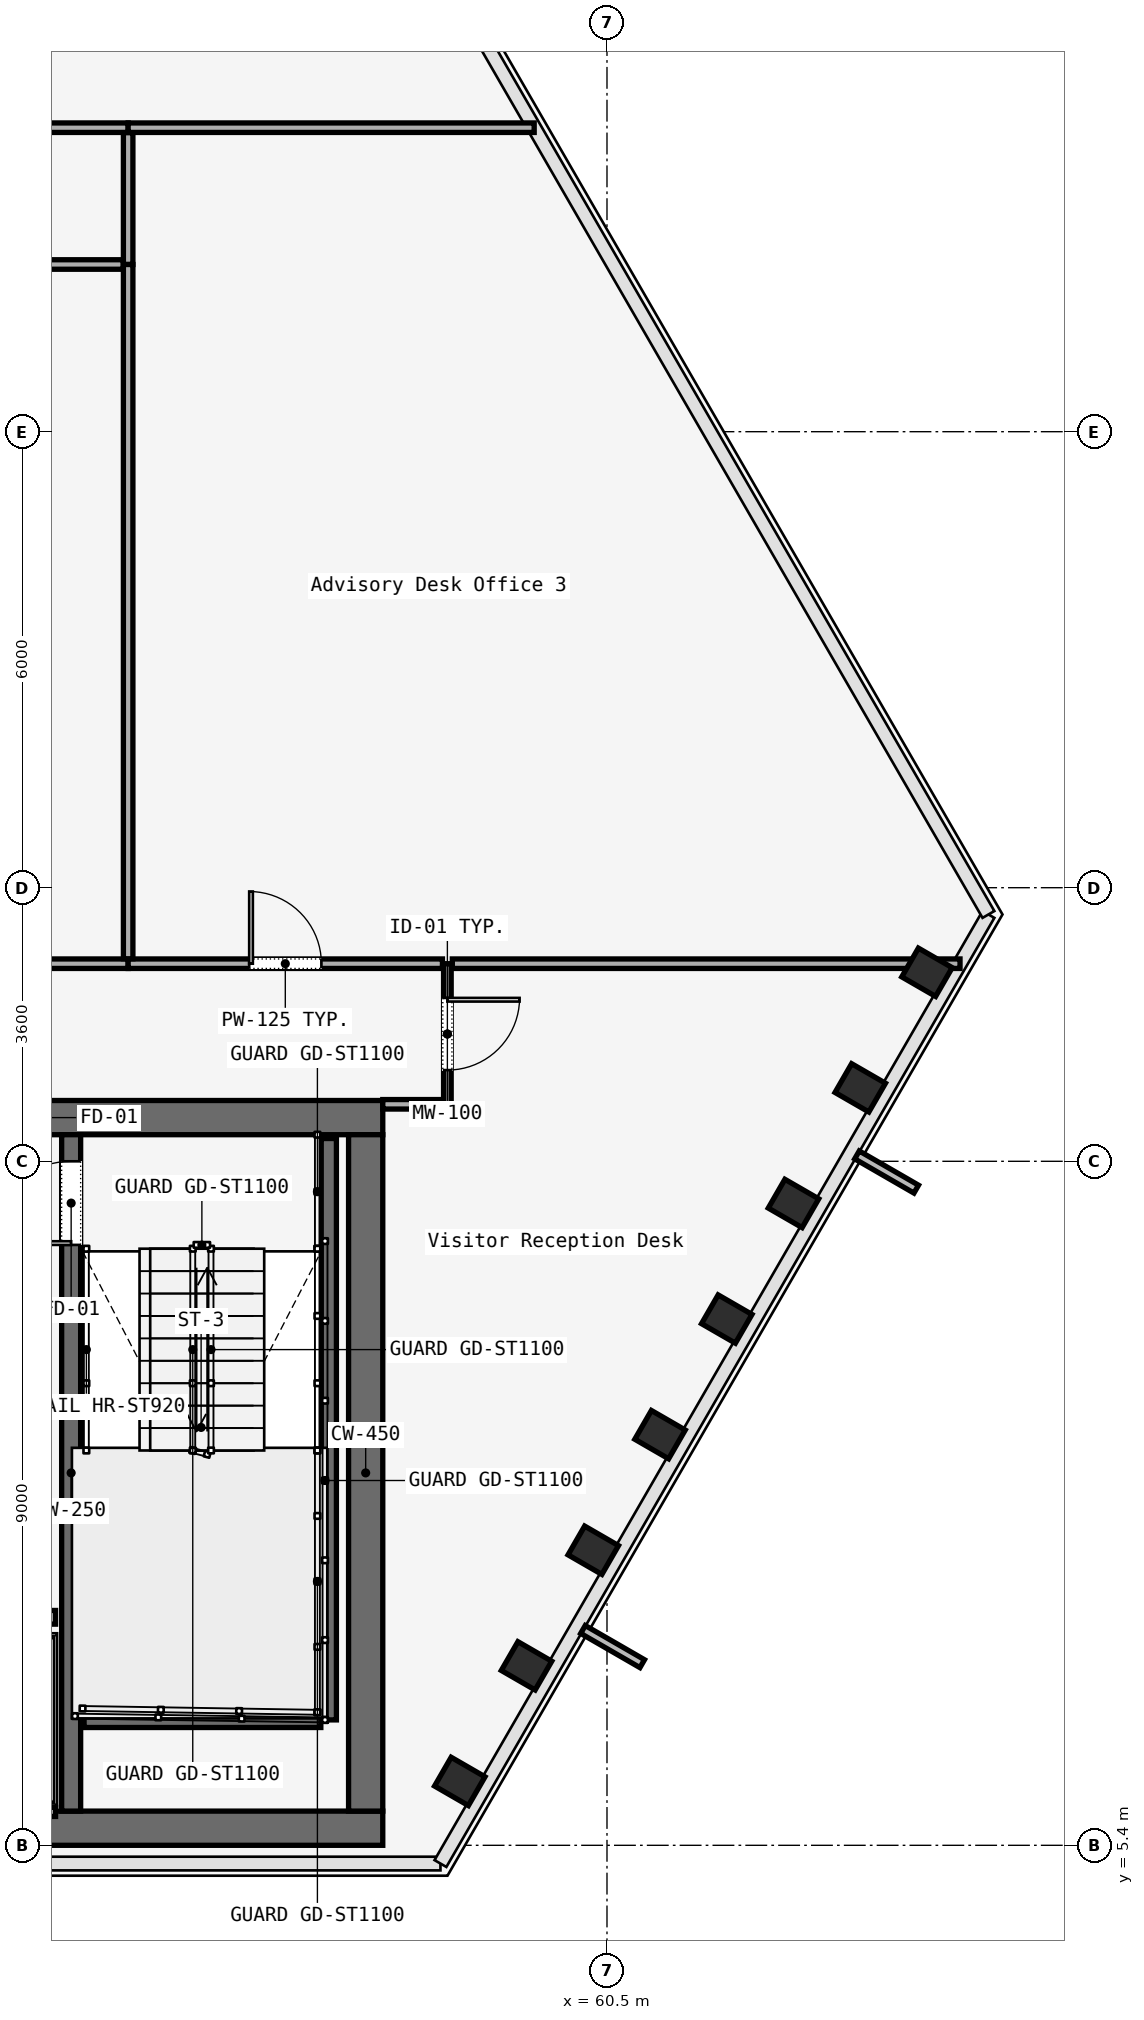
"""IFC4 building model, lengths in metres.
Left out: names, types, materials, properties, quantities, classifications, styles, units other than length and angle.
Written with IfcOpenShell. Run it as: python <this file> out.ifc"""

import sys

from ifc_helpers import new_model, si_unit, direction, frame, frame_2d, origin, origin_2d, place, context, subcontext, project, spatial, rectangle, i_section, extrude, element, fill, save


model = new_model("IFC4")
c1 = context("Model", 3, precision=1e-05, world=origin(), true_north=direction((0.0, 1.0)))
c2 = subcontext(c1, "Body", "Model", "MODEL_VIEW")
j1 = project(units=[si_unit("LENGTHUNIT", "METRE"), si_unit("PLANEANGLEUNIT", "RADIAN")], contexts=[c1])
p1 = place(None, origin())
s1 = spatial("IfcSite", under=j1, at=p1, CompositionType="ELEMENT")
p2 = place(p1, origin())
s2 = spatial("IfcBuilding", under=s1, at=p2, CompositionType="ELEMENT")
p3 = place(p2, frame((0.0, 0.0, 89.2)))
s3 = spatial("IfcBuildingStorey", under=s2, at=p3, CompositionType="ELEMENT", Elevation=89.2)
p4 = place(p3, frame((26.45, 14.975, 0.0), z_axis=(0.0, 0.0, 1.0), x_axis=(1.0, 0.0, 0.0)))
e1 = element("IfcWall", 1, at=p4, inside=s3, PredefinedType="SOLIDWALL", context=c2, shape_type="SweptSolid", body=[
    extrude(rectangle(XDim=31.1, YDim=0.45, at=frame_2d((15.55, 0.0))), origin(), (0.0, 0.0, 1.0), 3.58),
])
p5 = place(p4, frame((1.65, 0.0, 0.0)))
e2 = element("IfcOpeningElement", 2, at=p5, cuts=e1, PredefinedType="OPENING", context=c2, shape_type="SweptSolid", body=[
    extrude(rectangle(XDim=1.1, YDim=2.2, at=frame_2d((0.55, 1.1))), frame((0.0, 0.225, 0.0), z_axis=(0.0, -1.0, 0.0), x_axis=(1.0, 0.0, 0.0)), (0.0, 0.0, 1.0), 0.45),
])
p6 = place(p4, frame((13.65, 0.0, 0.0)))
e3 = element("IfcOpeningElement", 3, at=p6, cuts=e1, PredefinedType="OPENING", context=c2, shape_type="SweptSolid", body=[
    extrude(rectangle(XDim=1.1, YDim=2.2, at=frame_2d((0.55, 1.1))), frame((0.0, 0.225, 0.0), z_axis=(0.0, -1.0, 0.0), x_axis=(1.0, 0.0, 0.0)), (0.0, 0.0, 1.0), 0.45),
])
p7 = place(p4, frame((25.55, 0.0, 0.0)))
e4 = element("IfcOpeningElement", 4, at=p7, cuts=e1, PredefinedType="OPENING", context=c2, shape_type="SweptSolid", body=[
    extrude(rectangle(XDim=1.1, YDim=2.2, at=frame_2d((0.55, 1.1))), frame((0.0, 0.225, 0.0), z_axis=(0.0, -1.0, 0.0), x_axis=(1.0, 0.0, 0.0)), (0.0, 0.0, 1.0), 0.45),
])
p8 = place(p4, frame((10.7, 0.0, 0.0)))
e5 = element("IfcOpeningElement", 5, at=p8, cuts=e1, PredefinedType="OPENING", context=c2, shape_type="SweptSolid", body=[
    extrude(rectangle(XDim=1.4, YDim=2.2, at=frame_2d((0.7, 1.1))), frame((0.0, 0.225, 0.0), z_axis=(0.0, -1.0, 0.0), x_axis=(1.0, 0.0, 0.0)), (0.0, 0.0, 1.0), 0.45),
])
p9 = place(p4, frame((19.35, 0.0, 0.0)))
e6 = element("IfcOpeningElement", 6, at=p9, cuts=e1, PredefinedType="OPENING", context=c2, shape_type="SweptSolid", body=[
    extrude(rectangle(XDim=1.1, YDim=2.2, at=frame_2d((0.55, 1.1))), frame((0.0, 0.225, 0.0), z_axis=(0.0, -1.0, 0.0), x_axis=(1.0, 0.0, 0.0)), (0.0, 0.0, 1.0), 0.45),
])
p10 = place(p4, frame((21.4, 0.0, 0.0)))
e7 = element("IfcOpeningElement", 7, at=p10, cuts=e1, PredefinedType="OPENING", context=c2, shape_type="SweptSolid", body=[
    extrude(rectangle(XDim=0.9, YDim=2.1, at=frame_2d((0.45, 1.05))), frame((0.0, 0.225, 0.0), z_axis=(0.0, -1.0, 0.0), x_axis=(1.0, 0.0, 0.0)), (0.0, 0.0, 1.0), 0.45),
])
p11 = place(p4, frame((23.35, 0.0, 0.0)))
e8 = element("IfcOpeningElement", 8, at=p11, cuts=e1, PredefinedType="OPENING", context=c2, shape_type="SweptSolid", body=[
    extrude(rectangle(XDim=1.3, YDim=2.3, at=frame_2d((0.65, 1.15))), frame((0.0, 0.225, 0.0), z_axis=(0.0, -1.0, 0.0), x_axis=(1.0, 0.0, 0.0)), (0.0, 0.0, 1.0), 0.45),
])
p12 = place(p3, frame((26.45, 5.625, 0.0), z_axis=(0.0, 0.0, 1.0), x_axis=(1.0, 0.0, 0.0)))
e9 = element("IfcWall", 9, at=p12, inside=s3, PredefinedType="SOLIDWALL", context=c2, shape_type="SweptSolid", body=[
    extrude(rectangle(XDim=31.1, YDim=0.45, at=frame_2d((15.55, 0.0))), origin(), (0.0, 0.0, 1.0), 3.58),
])
p13 = place(p3, frame((57.325, 5.85, 0.0), z_axis=(0.0, 0.0, 1.0), x_axis=(0.0, 1.0, 0.0)))
e10 = element("IfcWall", 10, at=p13, inside=s3, PredefinedType="SOLIDWALL", context=c2, shape_type="SweptSolid", body=[
    extrude(rectangle(XDim=8.9, YDim=0.45, at=frame_2d((4.45, 0.0))), origin(), (0.0, 0.0, 1.0), 3.58),
])
p14 = place(p3, frame((53.45, 5.85, 0.0), z_axis=(0.0, 0.0, 1.0), x_axis=(0.0, 1.0, 0.0)))
e11 = element("IfcWall", 11, at=p14, inside=s3, PredefinedType="SOLIDWALL", context=c2, shape_type="SweptSolid", body=[
    extrude(rectangle(XDim=8.9, YDim=0.25, at=frame_2d((4.45, 0.0))), origin(), (0.0, 0.0, 1.0), 3.58),
])
p15 = place(p14, frame((7.45, 0.0, 0.0)))
e12 = element("IfcOpeningElement", 12, at=p15, cuts=e11, PredefinedType="OPENING", context=c2, shape_type="SweptSolid", body=[
    extrude(rectangle(XDim=1.1, YDim=2.2, at=frame_2d((0.55, 1.1))), frame((0.0, 0.125, 0.0), z_axis=(0.0, -1.0, 0.0), x_axis=(1.0, 0.0, 0.0)), (0.0, 0.0, 1.0), 0.25),
])
p16 = place(p3, frame((58.563, 6.24, 0.0), z_axis=(0.079599151352, -0.008496920511, 0.996790739045), x_axis=(-0.805297814331, 0.588803246695, 0.069326523896)))
e13 = element("IfcColumn", 13, at=p16, inside=s3, PredefinedType="COLUMN", context=c2, shape_type="SweptSolid", body=[
    extrude(i_section(OverallWidth=0.437, OverallDepth=0.514, WebThickness=0.061, FlangeThickness=0.077, FilletRadius=0.015, at=origin_2d()), origin(), (0.0, 0.0, 1.0), 3.592),
])
p17 = place(p3, frame((59.441, 7.761, 0.0), z_axis=(0.069841728492, -0.02543408613, 0.997233794165), x_axis=(-0.640403196751, 0.765336642111, 0.064370566504)))
e14 = element("IfcColumn", 14, at=p17, inside=s3, PredefinedType="COLUMN", context=c2, shape_type="SweptSolid", body=[
    extrude(i_section(OverallWidth=0.437, OverallDepth=0.514, WebThickness=0.061, FlangeThickness=0.077, FilletRadius=0.015, at=origin_2d()), origin(), (0.0, 0.0, 1.0), 3.59),
])
p18 = place(p3, frame((60.32, 9.282, 0.0), z_axis=(0.059984707223, -0.042438160212, 0.997296764989), x_axis=(-0.41629274108, 0.907001092511, 0.063634675352)))
e15 = element("IfcColumn", 15, at=p18, inside=s3, PredefinedType="COLUMN", context=c2, shape_type="SweptSolid", body=[
    extrude(i_section(OverallWidth=0.437, OverallDepth=0.514, WebThickness=0.061, FlangeThickness=0.077, FilletRadius=0.015, at=origin_2d()), origin(), (0.0, 0.0, 1.0), 3.59),
])
p19 = place(p3, frame((61.198, 10.803, 0.0), z_axis=(0.050175104004, -0.059353476687, 0.996975237277), x_axis=(-0.175563131942, 0.982164601536, 0.067307371012)))
e16 = element("IfcColumn", 16, at=p19, inside=s3, PredefinedType="COLUMN", context=c2, shape_type="SweptSolid", body=[
    extrude(i_section(OverallWidth=0.437, OverallDepth=0.514, WebThickness=0.061, FlangeThickness=0.077, FilletRadius=0.015, at=origin_2d()), origin(), (0.0, 0.0, 1.0), 3.591),
])
p20 = place(p3, frame((62.076, 12.324, 0.0), z_axis=(0.040424026835, -0.076296104429, 0.996265427737), x_axis=(0.037878466592, 0.996480719154, 0.074775651936)))
e17 = element("IfcColumn", 17, at=p20, inside=s3, PredefinedType="COLUMN", context=c2, shape_type="SweptSolid", body=[
    extrude(i_section(OverallWidth=0.437, OverallDepth=0.514, WebThickness=0.061, FlangeThickness=0.077, FilletRadius=0.015, at=origin_2d()), origin(), (0.0, 0.0, 1.0), 3.594),
])
p21 = place(p3, frame((62.954, 13.845, 0.0), z_axis=(0.030539703682, -0.093112163226, 0.995187143988), x_axis=(0.206497376951, 0.974759930435, 0.084864075622)))
e18 = element("IfcColumn", 18, at=p21, inside=s3, PredefinedType="COLUMN", context=c2, shape_type="SweptSolid", body=[
    extrude(i_section(OverallWidth=0.437, OverallDepth=0.514, WebThickness=0.061, FlangeThickness=0.077, FilletRadius=0.015, at=origin_2d()), origin(), (0.0, 0.0, 1.0), 3.597),
])
p22 = place(p3, frame((63.832, 15.366, 0.0), z_axis=(0.020804367699, -0.109849772116, 0.993730449292), x_axis=(0.331126240507, 0.938605650545, 0.096823786395)))
e19 = element("IfcColumn", 19, at=p22, inside=s3, PredefinedType="COLUMN", context=c2, shape_type="SweptSolid", body=[
    extrude(i_section(OverallWidth=0.437, OverallDepth=0.514, WebThickness=0.061, FlangeThickness=0.077, FilletRadius=0.015, at=origin_2d()), origin(), (0.0, 0.0, 1.0), 3.603),
])
p23 = place(p3, frame((64.71, 16.887, 0.0), z_axis=(0.011025598109, -0.126557632283, 0.991897979581), x_axis=(0.423559529264, 0.899162680827, 0.110017264904)))
e20 = element("IfcColumn", 20, at=p23, inside=s3, PredefinedType="COLUMN", context=c2, shape_type="SweptSolid", body=[
    extrude(i_section(OverallWidth=0.437, OverallDepth=0.514, WebThickness=0.061, FlangeThickness=0.077, FilletRadius=0.015, at=origin_2d()), origin(), (0.0, 0.0, 1.0), 3.609),
])
p24 = place(p3, frame((56.84, 14.7, 0.0), z_axis=(0.0, 0.0, 1.0), x_axis=(0.0, -1.0, 0.0)))
e21 = element("IfcWall", 21, at=p24, inside=s3, PredefinedType="SOLIDWALL", context=c2, shape_type="SweptSolid", body=[
    extrude(rectangle(XDim=7.65, YDim=0.2, at=frame_2d((3.825, 0.0))), origin(), (0.0, 0.0, 1.0), 3.8),
])
p25 = place(p3, frame((53.62, 7.05, 0.0), z_axis=(0.0, 0.0, 1.0), x_axis=(1.0, 0.0, 0.0)))
e22 = element("IfcWall", 22, at=p25, inside=s3, PredefinedType="SOLIDWALL", context=c2, shape_type="SweptSolid", body=[
    extrude(rectangle(XDim=3.115, YDim=0.2, at=frame_2d((1.558, 0.0))), origin(), (0.0, 0.0, 1.0), 3.8),
])
p26 = place(p3, frame((51.555, 8.4, 0.0), z_axis=(0.0, 0.0, 1.0), x_axis=(1.0, 0.0, 0.0)))
e23 = element("IfcWall", 23, at=p26, inside=s3, PredefinedType="SOLIDWALL", context=c2, shape_type="SweptSolid", body=[
    extrude(rectangle(XDim=1.69, YDim=0.18, at=frame_2d((0.845, 0.0))), origin(), (0.0, 0.0, 1.0), 2.95),
])
p27 = place(p26, frame((0.295, 0.0, 0.0)))
e24 = element("IfcOpeningElement", 24, at=p27, cuts=e23, PredefinedType="OPENING", context=c2, shape_type="SweptSolid", body=[
    extrude(rectangle(XDim=1.1, YDim=2.2, at=frame_2d((0.55, 1.1))), frame((0.0, 0.09, 0.0), z_axis=(0.0, -1.0, 0.0), x_axis=(1.0, 0.0, 0.0)), (0.0, 0.0, 1.0), 0.18),
])
p28 = place(p3, frame((51.555, 5.84, 0.0), z_axis=(0.0, 0.0, 1.0), x_axis=(1.0, 0.0, 0.0)))
e25 = element("IfcWall", 25, at=p28, inside=s3, PredefinedType="SOLIDWALL", context=c2, shape_type="SweptSolid", body=[
    extrude(rectangle(XDim=1.69, YDim=0.12, at=frame_2d((0.845, 0.0))), origin(), (0.0, 0.0, 1.0), 2.95),
])
p29 = place(p3, frame((58.4, 17.0, 0.0), z_axis=(0.0, 0.0, 1.0), x_axis=(0.0, -1.0, 0.0)))
e26 = element("IfcWall", 26, at=p29, inside=s3, PredefinedType="MOVABLE", context=c2, shape_type="SweptSolid", body=[
    extrude(rectangle(XDim=1.85, YDim=0.1, at=frame_2d((0.925, 0.0))), origin(), (0.0, 0.0, 1.0), 2.95),
])
p30 = place(p29, frame((0.45, 0.0, 0.0)))
e27 = element("IfcOpeningElement", 27, at=p30, cuts=e26, PredefinedType="OPENING", context=c2, shape_type="SweptSolid", body=[
    extrude(rectangle(XDim=0.95, YDim=2.2, at=frame_2d((0.475, 1.1))), frame((0.0, 0.05, 0.0), z_axis=(0.0, -1.0, 0.0), x_axis=(1.0, 0.0, 0.0)), (0.0, 0.0, 1.0), 0.1),
])
p31 = place(p3, frame((58.335, 15.15, 0.0), z_axis=(0.0, 0.0, 1.0), x_axis=(-1.0, 0.0, 0.0)))
e28 = element("IfcWall", 28, at=p31, inside=s3, PredefinedType="PARTITIONING", context=c2, shape_type="SweptSolid", body=[
    extrude(rectangle(XDim=0.785, YDim=0.125, at=frame_2d((0.393, 0.0))), origin(), (0.0, 0.0, 1.0), 2.95),
])
p32 = place(p3, frame((46.8, 28.0, 0.0), z_axis=(0.0, 0.0, 1.0), x_axis=(1.0, 0.0, 0.0)))
e29 = element("IfcWall", 29, at=p32, inside=s3, PredefinedType="PARTITIONING", context=c2, shape_type="SweptSolid", body=[
    extrude(rectangle(XDim=7.4, YDim=0.125, at=frame_2d((3.7, 0.0))), origin(), (0.0, 0.0, 1.0), 2.95),
])
p33 = place(p32, frame((3.0, 0.0, 0.0)))
e30 = element("IfcOpeningElement", 30, at=p33, cuts=e29, PredefinedType="OPENING", context=c2, shape_type="SweptSolid", body=[
    extrude(rectangle(XDim=1.4, YDim=2.2, at=frame_2d((0.7, 1.1))), frame((0.0, 0.062, 0.0), z_axis=(0.0, -1.0, 0.0), x_axis=(1.0, 0.0, 0.0)), (0.0, 0.0, 1.0), 0.125),
])
p34 = place(p3, frame((54.2, 27.935, 0.0), z_axis=(0.0, 0.0, 1.0), x_axis=(0.0, -1.0, 0.0)))
e31 = element("IfcWall", 31, at=p34, inside=s3, PredefinedType="PARTITIONING", context=c2, shape_type="SweptSolid", body=[
    extrude(rectangle(XDim=1.735, YDim=0.125, at=frame_2d((0.868, 0.0))), origin(), (0.0, 0.0, 1.0), 2.95),
])
p35 = place(p3, frame((54.135, 26.2, 0.0), z_axis=(0.0, 0.0, 1.0), x_axis=(-1.0, 0.0, 0.0)))
e32 = element("IfcWall", 32, at=p35, inside=s3, PredefinedType="PARTITIONING", context=c2, shape_type="SweptSolid", body=[
    extrude(rectangle(XDim=10.684, YDim=0.125, at=frame_2d((5.342, 0.0))), origin(), (0.0, 0.0, 1.0), 2.95),
])
p36 = place(p3, frame((43.451, 17.0, 0.0), z_axis=(0.0, 0.0, 1.0), x_axis=(1.0, 0.0, 0.0)))
e33 = element("IfcWall", 33, at=p36, inside=s3, PredefinedType="PARTITIONING", context=c2, shape_type="SweptSolid", body=[
    extrude(rectangle(XDim=10.749, YDim=0.125, at=frame_2d((5.374, 0.0))), origin(), (0.0, 0.0, 1.0), 2.95),
])
p37 = place(p36, frame((4.899, 0.0, 0.0)))
e34 = element("IfcOpeningElement", 34, at=p37, cuts=e33, PredefinedType="OPENING", context=c2, shape_type="SweptSolid", body=[
    extrude(rectangle(XDim=0.95, YDim=2.2, at=frame_2d((0.475, 1.1))), frame((0.0, 0.062, 0.0), z_axis=(0.0, -1.0, 0.0), x_axis=(1.0, 0.0, 0.0)), (0.0, 0.0, 1.0), 0.125),
])
p38 = place(p3, frame((54.2, 17.0, 0.0), z_axis=(0.0, 0.0, 1.0), x_axis=(1.0, 0.0, 0.0)))
e35 = element("IfcWall", 35, at=p38, inside=s3, PredefinedType="PARTITIONING", context=c2, shape_type="SweptSolid", body=[
    extrude(rectangle(XDim=4.135, YDim=0.125, at=frame_2d((2.067, 0.0))), origin(), (0.0, 0.0, 1.0), 2.95),
])
p39 = place(p38, frame((1.593, 0.0, 0.0)))
e36 = element("IfcOpeningElement", 36, at=p39, cuts=e35, PredefinedType="OPENING", context=c2, shape_type="SweptSolid", body=[
    extrude(rectangle(XDim=0.95, YDim=2.2, at=frame_2d((0.475, 1.1))), frame((0.0, 0.062, 0.0), z_axis=(0.0, -1.0, 0.0), x_axis=(1.0, 0.0, 0.0)), (0.0, 0.0, 1.0), 0.125),
])
p40 = place(p3, frame((58.465, 17.0, 0.0), z_axis=(0.0, 0.0, 1.0), x_axis=(1.0, 0.0, 0.0)))
e37 = element("IfcWall", 37, at=p40, inside=s3, PredefinedType="PARTITIONING", context=c2, shape_type="SweptSolid", body=[
    extrude(rectangle(XDim=6.68, YDim=0.125, at=frame_2d((3.34, 0.0))), origin(), (0.0, 0.0, 1.0), 2.95),
])
p41 = place(p3, frame((54.2, 26.2, 0.0), z_axis=(0.0, 0.0, 1.0), x_axis=(0.0, -1.0, 0.0)))
e38 = element("IfcWall", 38, at=p41, inside=s3, PredefinedType="PARTITIONING", context=c2, shape_type="SweptSolid", body=[
    extrude(rectangle(XDim=9.135, YDim=0.125, at=frame_2d((4.567, 0.0))), origin(), (0.0, 0.0, 1.0), 2.95),
])
p42 = place(p3, frame((54.2, 28.0, 0.0), z_axis=(0.0, 0.0, 1.0), x_axis=(1.0, 0.0, 0.0)))
e39 = element("IfcWall", 39, at=p42, inside=s3, PredefinedType="PARTITIONING", context=c2, shape_type="SweptSolid", body=[
    extrude(rectangle(XDim=5.342, YDim=0.125, at=frame_2d((2.671, 0.0))), origin(), (0.0, 0.0, 1.0), 2.95),
])
p43 = place(p15, origin())
e40 = element("IfcDoor", 40, at=p43, inside=s3, OperationType="SINGLE_SWING_LEFT", PredefinedType="DOOR", context=c2, shape_type="SweptSolid", body=[
    extrude(rectangle(XDim=1.1, YDim=2.2, at=frame_2d((0.55, 1.1))), frame((0.0, 0.025, 0.0), z_axis=(0.0, -1.0, 0.0), x_axis=(1.0, 0.0, 0.0)), (0.0, 0.0, 1.0), 0.05),
])
fill(e12, e40)
p44 = place(p30, origin())
e41 = element("IfcDoor", 41, at=p44, inside=s3, OperationType="SINGLE_SWING_RIGHT", PredefinedType="DOOR", context=c2, shape_type="SweptSolid", body=[
    extrude(rectangle(XDim=0.95, YDim=2.2, at=frame_2d((0.475, 1.1))), frame((0.0, 0.025, 0.0), z_axis=(0.0, -1.0, 0.0), x_axis=(1.0, 0.0, 0.0)), (0.0, 0.0, 1.0), 0.05),
])
fill(e27, e41)
p45 = place(p39, origin())
e42 = element("IfcDoor", 42, at=p45, inside=s3, OperationType="SINGLE_SWING_LEFT", PredefinedType="DOOR", context=c2, shape_type="SweptSolid", body=[
    extrude(rectangle(XDim=0.95, YDim=2.2, at=frame_2d((0.475, 1.1))), frame((0.0, 0.025, 0.0), z_axis=(0.0, -1.0, 0.0), x_axis=(1.0, 0.0, 0.0)), (0.0, 0.0, 1.0), 0.05),
])
fill(e36, e42)
save(model, sys.argv[1])
